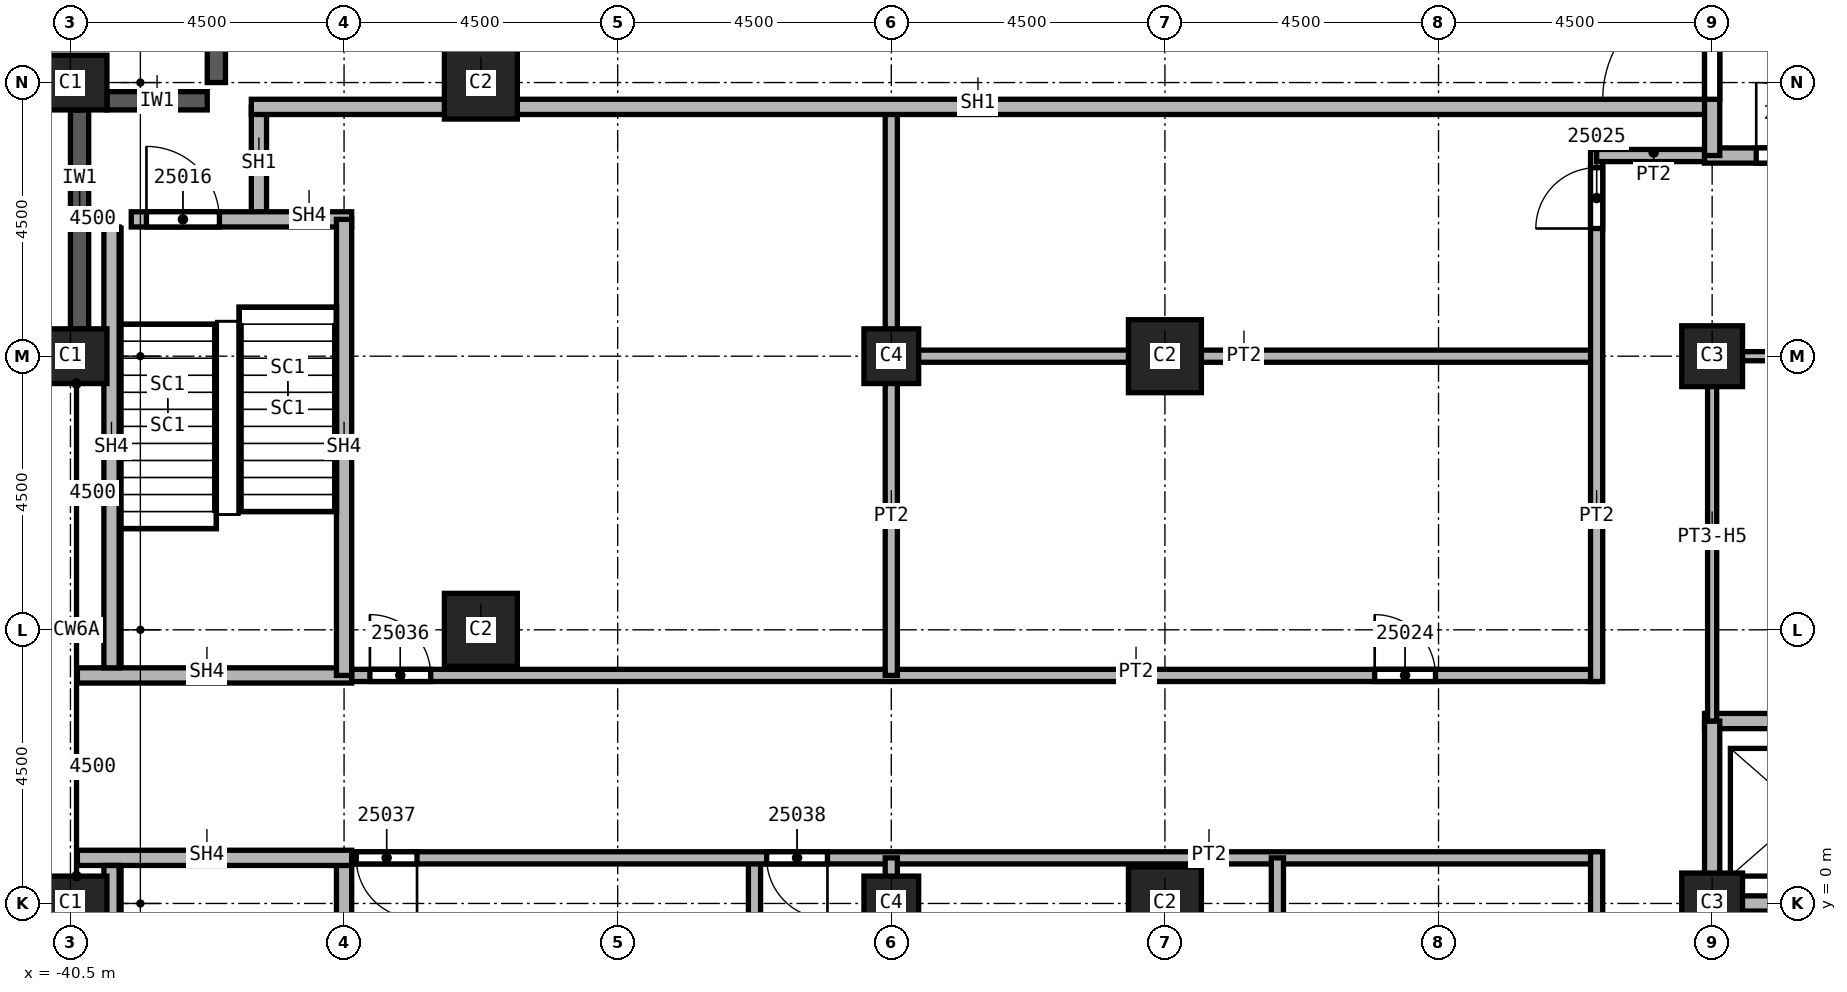
"""IFC4 building model, lengths in metres.
Left out: names, types, materials, properties, quantities, classifications, styles, units other than length and angle.
Written with IfcOpenShell. Run it as: python <this file> out.ifc"""

import sys

from ifc_helpers import new_model, si_unit, direction, frame, frame_2d, origin, origin_2d, place, context, subcontext, project, spatial, rectangle, extrude, element, fill, save


model = new_model("IFC4")
c1 = context("Model", 3, precision=1e-05, world=origin(), true_north=direction((0.0, 1.0)))
c2 = subcontext(c1, "Body", "Model", "MODEL_VIEW")
j1 = project(units=[si_unit("LENGTHUNIT", "METRE"), si_unit("PLANEANGLEUNIT", "RADIAN")], contexts=[c1])
p1 = place(None, origin())
s1 = spatial("IfcSite", under=j1, at=p1, CompositionType="ELEMENT")
p2 = place(p1, origin())
s2 = spatial("IfcBuilding", under=s1, at=p2, CompositionType="ELEMENT")
p3 = place(p2, frame((0.0, 0.0, 60.0)))
s3 = spatial("IfcBuildingStorey", under=s2, at=p3, CompositionType="ELEMENT", Elevation=60.0)
for number, where, z_axis, x_axis in (
    (1, (-40.5, 0.0, 0.0), (0.0, 0.0, 1.0), (0.0, 1.0, 0.0)),
    (2, (-40.5, 9.0, 0.0), (0.0, 0.0, 1.0), (0.0, 1.0, 0.0)),
    (3, (-40.5, 13.5, 0.0), (0.0, 0.0, 1.0), (0.0, 1.0, 0.0)),
):
    element("IfcColumn", number, at=place(p3, frame(where, z_axis=z_axis, x_axis=x_axis)), inside=s3, PredefinedType="COLUMN", context=c2, shape_type="SweptSolid", body=[
        extrude(rectangle(XDim=0.9, YDim=1.2, at=origin_2d()), origin(), (0.0, 0.0, 1.0), 7.7),
    ])
for number, where, z_axis, x_axis in (
    (4, (-33.75, 4.5, 0.0), (0.0, 0.0, 1.0), (1.0, 0.0, 0.0)),
    (5, (-33.75, 13.5, 0.0), (0.0, 0.0, 1.0), (1.0, 0.0, 0.0)),
    (6, (-22.5, 0.0, 0.0), (0.0, 0.0, 1.0), (1.0, 0.0, 0.0)),
    (7, (-22.5, 9.0, 0.0), (0.0, 0.0, 1.0), (1.0, 0.0, 0.0)),
):
    element("IfcColumn", number, at=place(p3, frame(where, z_axis=z_axis, x_axis=x_axis)), inside=s3, PredefinedType="COLUMN", context=c2, shape_type="SweptSolid", body=[
        extrude(rectangle(XDim=1.2, YDim=1.2, at=origin_2d()), origin(), (0.0, 0.0, 1.0), 7.7),
    ])
for number, where, z_axis, x_axis in (
    (8, (-13.5, 0.0, 0.0), (0.0, 0.0, 1.0), (1.0, 0.0, 0.0)),
    (9, (-13.5, 9.0, 0.0), (0.0, 0.0, 1.0), (1.0, 0.0, 0.0)),
):
    element("IfcColumn", number, at=place(p3, frame(where, z_axis=z_axis, x_axis=x_axis)), inside=s3, PredefinedType="COLUMN", context=c2, shape_type="SweptSolid", body=[
        extrude(rectangle(XDim=1.0, YDim=1.0, at=origin_2d()), origin(), (0.0, 0.0, 1.0), 7.7),
    ])
for number, where, z_axis, x_axis in (
    (10, (-27.0, 0.0, 0.0), (0.0, 0.0, 1.0), (1.0, 0.0, 0.0)),
    (11, (-27.0, 9.0, 0.0), (0.0, 0.0, 1.0), (1.0, 0.0, 0.0)),
):
    element("IfcColumn", number, at=place(p3, frame(where, z_axis=z_axis, x_axis=x_axis)), inside=s3, PredefinedType="COLUMN", context=c2, shape_type="SweptSolid", body=[
        extrude(rectangle(XDim=0.9, YDim=0.9, at=origin_2d()), origin(), (0.0, 0.0, 1.0), 7.7),
    ])
p4 = place(p3, frame((-38.1, 15.3, 0.0), z_axis=(0.0, 0.0, 1.0), x_axis=(0.0, -1.0, 0.0)))
e12 = element("IfcWall", 12, at=p4, inside=s3, PredefinedType="SOLIDWALL", context=c2, shape_type="SweptSolid", body=[
    extrude(rectangle(XDim=1.8, YDim=0.3, at=frame_2d((0.9, 0.0))), origin(), (0.0, 0.0, 1.0), 7.1),
])
p5 = place(p3, frame((-39.9, 13.2, 0.0), z_axis=(0.0, 0.0, 1.0), x_axis=(1.0, 0.0, 0.0)))
e13 = element("IfcWall", 13, at=p5, inside=s3, PredefinedType="SOLIDWALL", context=c2, shape_type="SweptSolid", body=[
    extrude(rectangle(XDim=1.65, YDim=0.3, at=frame_2d((0.825, 0.0))), origin(), (0.0, 0.0, 1.0), 7.1),
])
p6 = place(p3, frame((-40.35, 13.05, 0.0), z_axis=(0.0, 0.0, 1.0), x_axis=(0.0, -1.0, 0.0)))
e14 = element("IfcWall", 14, at=p6, inside=s3, PredefinedType="SOLIDWALL", context=c2, shape_type="SweptSolid", body=[
    extrude(rectangle(XDim=3.6, YDim=0.3, at=frame_2d((1.8, 0.0))), origin(), (0.0, 0.0, 1.0), 7.1),
])
p7 = place(p3, frame((-36.125, 3.75, 0.0), z_axis=(0.0, 0.0, 1.0), x_axis=(1.0, 0.0, 0.0)))
e15 = element("IfcWall", 15, at=p7, inside=s3, PredefinedType="PARTITIONING", context=c2, shape_type="SweptSolid", body=[
    extrude(rectangle(XDim=20.725, YDim=0.2, at=frame_2d((10.363, 0.0))), origin(), (0.0, 0.0, 1.0), 7.7),
])
p8 = place(p7, frame((17.075, 0.0, 0.0)))
e16 = element("IfcOpeningElement", 16, at=p8, cuts=e15, PredefinedType="OPENING", context=c2, shape_type="SweptSolid", body=[
    extrude(rectangle(XDim=1.0, YDim=2.1, at=frame_2d((0.5, 1.05))), frame((0.0, 0.1, 0.0), z_axis=(0.0, -1.0, 0.0), x_axis=(1.0, 0.0, 0.0)), (0.0, 0.0, 1.0), 0.2),
])
p9 = place(p7, frame((0.55, 0.0, 0.0)))
e17 = element("IfcOpeningElement", 17, at=p9, cuts=e15, PredefinedType="OPENING", context=c2, shape_type="SweptSolid", body=[
    extrude(rectangle(XDim=1.0, YDim=2.1, at=frame_2d((0.5, 1.05))), frame((0.0, 0.1, 0.0), z_axis=(0.0, -1.0, 0.0), x_axis=(1.0, 0.0, 0.0)), (0.0, 0.0, 1.0), 0.2),
])
p10 = place(p3, frame((-29.25, 0.75, 0.0), z_axis=(0.0, 0.0, 1.0), x_axis=(0.0, -1.0, 0.0)))
e18 = element("IfcWall", 18, at=p10, inside=s3, PredefinedType="PARTITIONING", context=c2, shape_type="SweptSolid", body=[
    extrude(rectangle(XDim=16.65, YDim=0.2, at=frame_2d((8.325, 0.0))), origin(), (0.0, 0.0, 1.0), 7.7),
])
p11 = place(p3, frame((-15.4, 0.75, 0.0), z_axis=(0.0, 0.0, 1.0), x_axis=(-1.0, 0.0, 0.0)))
e19 = element("IfcWall", 19, at=p11, inside=s3, PredefinedType="PARTITIONING", context=c2, shape_type="SweptSolid", body=[
    extrude(rectangle(XDim=20.725, YDim=0.2, at=frame_2d((10.363, 0.0))), origin(), (0.0, 0.0, 1.0), 7.7),
])
p12 = place(p11, frame((19.4, 0.0, 0.0)))
e20 = element("IfcOpeningElement", 20, at=p12, cuts=e19, PredefinedType="OPENING", context=c2, shape_type="SweptSolid", body=[
    extrude(rectangle(XDim=1.0, YDim=2.1, at=frame_2d((0.5, 1.05))), frame((0.0, 0.1, 0.0), z_axis=(0.0, -1.0, 0.0), x_axis=(1.0, 0.0, 0.0)), (0.0, 0.0, 1.0), 0.2),
])
p13 = place(p11, frame((12.65, 0.0, 0.0)))
e21 = element("IfcOpeningElement", 21, at=p13, cuts=e19, PredefinedType="OPENING", context=c2, shape_type="SweptSolid", body=[
    extrude(rectangle(XDim=1.0, YDim=2.1, at=frame_2d((0.5, 1.05))), frame((0.0, 0.1, 0.0), z_axis=(0.0, -1.0, 0.0), x_axis=(1.0, 0.0, 0.0)), (0.0, 0.0, 1.0), 0.2),
])
p14 = place(p3, frame((-27.1, 9.0, 0.0), z_axis=(0.0, 0.0, 1.0), x_axis=(1.0, 0.0, 0.0)))
e22 = element("IfcWall", 22, at=p14, inside=s3, PredefinedType="PARTITIONING", context=c2, shape_type="SweptSolid", body=[
    extrude(rectangle(XDim=11.7, YDim=0.2, at=frame_2d((5.85, 0.0))), origin(), (0.0, 0.0, 1.0), 7.7),
])
p15 = place(p3, frame((-27.0, -15.75, 0.0), z_axis=(0.0, 0.0, 1.0), x_axis=(0.0, 1.0, 0.0)))
e23 = element("IfcWall", 23, at=p15, inside=s3, PredefinedType="PARTITIONING", context=c2, shape_type="SweptSolid", body=[
    extrude(rectangle(XDim=16.5, YDim=0.2, at=frame_2d((8.25, 0.0))), origin(), (0.0, 0.0, 1.0), 7.7),
])
p16 = place(p3, frame((-27.0, 3.75, 0.0), z_axis=(0.0, 0.0, 1.0), x_axis=(0.0, 1.0, 0.0)))
e24 = element("IfcWall", 24, at=p16, inside=s3, PredefinedType="PARTITIONING", context=c2, shape_type="SweptSolid", body=[
    extrude(rectangle(XDim=9.35, YDim=0.2, at=frame_2d((4.675, 0.0))), origin(), (0.0, 0.0, 1.0), 7.7),
])
p17 = place(p3, frame((-20.65, -6.75, 0.0), z_axis=(0.0, 0.0, 1.0), x_axis=(0.0, 1.0, 0.0)))
e25 = element("IfcWall", 25, at=p17, inside=s3, PredefinedType="PARTITIONING", context=c2, shape_type="SweptSolid", body=[
    extrude(rectangle(XDim=7.5, YDim=0.2, at=frame_2d((3.75, 0.0))), origin(), (0.0, 0.0, 1.0), 7.7),
])
p18 = place(p17, frame((1.45, 0.0, 0.0)))
e26 = element("IfcOpeningElement", 26, at=p18, cuts=e25, PredefinedType="OPENING", context=c2, shape_type="SweptSolid", body=[
    extrude(rectangle(XDim=1.0, YDim=2.1, at=frame_2d((0.5, 1.05))), frame((0.0, 0.1, 0.0), z_axis=(0.0, -1.0, 0.0), x_axis=(1.0, 0.0, 0.0)), (0.0, 0.0, 1.0), 0.2),
])
p19 = place(p3, frame((-15.4, -12.3, 0.0), z_axis=(0.0, 0.0, 1.0), x_axis=(0.0, 1.0, 0.0)))
e27 = element("IfcWall", 27, at=p19, inside=s3, PredefinedType="PARTITIONING", context=c2, shape_type="SweptSolid", body=[
    extrude(rectangle(XDim=13.15, YDim=0.2, at=frame_2d((6.575, 0.0))), origin(), (0.0, 0.0, 1.0), 7.7),
])
p20 = place(p19, frame((2.85, 0.0, 0.0)))
e28 = element("IfcOpeningElement", 28, at=p20, cuts=e27, PredefinedType="OPENING", context=c2, shape_type="SweptSolid", body=[
    extrude(rectangle(XDim=1.0, YDim=2.1, at=frame_2d((0.5, 1.05))), frame((0.0, 0.1, 0.0), z_axis=(0.0, -1.0, 0.0), x_axis=(1.0, 0.0, 0.0)), (0.0, 0.0, 1.0), 0.2),
])
p21 = place(p19, frame((7.95, 0.0, 0.0)))
e29 = element("IfcOpeningElement", 29, at=p21, cuts=e27, PredefinedType="OPENING", context=c2, shape_type="SweptSolid", body=[
    extrude(rectangle(XDim=1.0, YDim=2.1, at=frame_2d((0.5, 1.05))), frame((0.0, 0.1, 0.0), z_axis=(0.0, -1.0, 0.0), x_axis=(1.0, 0.0, 0.0)), (0.0, 0.0, 1.0), 0.2),
])
p22 = place(p3, frame((-15.4, 3.65, 0.0), z_axis=(0.0, 0.0, 1.0), x_axis=(0.0, 1.0, 0.0)))
e30 = element("IfcWall", 30, at=p22, inside=s3, PredefinedType="PARTITIONING", context=c2, shape_type="SweptSolid", body=[
    extrude(rectangle(XDim=8.75, YDim=0.2, at=frame_2d((4.375, 0.0))), origin(), (0.0, 0.0, 1.0), 7.7),
])
p23 = place(p22, frame((7.45, 0.0, 0.0)))
e31 = element("IfcOpeningElement", 31, at=p23, cuts=e30, PredefinedType="OPENING", context=c2, shape_type="SweptSolid", body=[
    extrude(rectangle(XDim=1.0, YDim=2.1, at=frame_2d((0.5, 1.05))), frame((0.0, 0.1, 0.0), z_axis=(0.0, -1.0, 0.0), x_axis=(1.0, 0.0, 0.0)), (0.0, 0.0, 1.0), 0.2),
])
p24 = place(p3, frame((-15.4, 12.3, 0.0), z_axis=(0.0, 0.0, 1.0), x_axis=(1.0, 0.0, 0.0)))
e32 = element("IfcWall", 32, at=p24, inside=s3, PredefinedType="PARTITIONING", context=c2, shape_type="SweptSolid", body=[
    extrude(rectangle(XDim=2.025, YDim=0.2, at=frame_2d((1.012, 0.0))), origin(), (0.0, 0.0, 1.0), 7.7),
])
p25 = place(p3, frame((-37.4, 13.1, 0.0), z_axis=(0.0, 0.0, 1.0), x_axis=(0.0, -1.0, 0.0)))
e33 = element("IfcWall", 33, at=p25, inside=s3, PredefinedType="SOLIDWALL", context=c2, shape_type="SweptSolid", body=[
    extrude(rectangle(XDim=1.85, YDim=0.25, at=frame_2d((0.925, 0.0))), origin(), (0.0, 0.0, 1.0), 7.7),
])
p26 = place(p3, frame((-13.5, 13.1, 0.0), z_axis=(0.0, 0.0, 1.0), x_axis=(-1.0, 0.0, 0.0)))
e34 = element("IfcWall", 34, at=p26, inside=s3, PredefinedType="SOLIDWALL", context=c2, shape_type="SweptSolid", body=[
    extrude(rectangle(XDim=24.025, YDim=0.25, at=frame_2d((12.012, 0.0))), origin(), (0.0, 0.0, 1.0), 7.7),
])
p27 = place(p3, frame((-13.625, 0.0, 0.0), z_axis=(0.0, 0.0, 1.0), x_axis=(1.0, 0.0, 0.0)))
e35 = element("IfcWall", 35, at=p27, inside=s3, PredefinedType="SOLIDWALL", context=c2, shape_type="SweptSolid", body=[
    extrude(rectangle(XDim=3.125, YDim=0.25, at=frame_2d((1.562, 0.0))), origin(), (0.0, 0.0, 1.0), 7.7),
])
p28 = place(p3, frame((-13.625, 3.0, 0.0), z_axis=(0.0, 0.0, 1.0), x_axis=(1.0, 0.0, 0.0)))
e36 = element("IfcWall", 36, at=p28, inside=s3, PredefinedType="SOLIDWALL", context=c2, shape_type="SweptSolid", body=[
    extrude(rectangle(XDim=6.125, YDim=0.25, at=frame_2d((3.062, 0.0))), origin(), (0.0, 0.0, 1.0), 7.7),
])
p29 = place(p28, frame((3.25, 0.0, 0.0)))
e37 = element("IfcOpeningElement", 37, at=p29, cuts=e36, PredefinedType="OPENING", context=c2, shape_type="SweptSolid", body=[
    extrude(rectangle(XDim=1.1, YDim=2.1, at=frame_2d((0.55, 1.05))), frame((0.0, 0.125, 0.0), z_axis=(0.0, -1.0, 0.0), x_axis=(1.0, 0.0, 0.0)), (0.0, 0.0, 1.0), 0.25),
])
p30 = place(p3, frame((-13.5, -3.0, 0.0), z_axis=(0.0, 0.0, 1.0), x_axis=(0.0, 1.0, 0.0)))
e38 = element("IfcWall", 38, at=p30, inside=s3, PredefinedType="SOLIDWALL", context=c2, shape_type="SweptSolid", body=[
    extrude(rectangle(XDim=6.0, YDim=0.25, at=frame_2d((3.0, 0.0))), origin(), (0.0, 0.0, 1.0), 6.938),
])
p31 = place(p3, frame((-40.386, 3.75, 0.0), z_axis=(0.0, 0.0, 1.0), x_axis=(1.0, 0.0, 0.0)))
e39 = element("IfcWall", 39, at=p31, inside=s3, PredefinedType="SOLIDWALL", context=c2, shape_type="SweptSolid", body=[
    extrude(rectangle(XDim=4.511, YDim=0.25, at=frame_2d((2.255, 0.0))), origin(), (0.0, 0.0, 1.0), 7.7),
])
p32 = place(p3, frame((-39.5, 11.25, 0.0), z_axis=(0.0, 0.0, 1.0), x_axis=(1.0, 0.0, 0.0)))
e40 = element("IfcWall", 40, at=p32, inside=s3, PredefinedType="SOLIDWALL", context=c2, shape_type="SweptSolid", body=[
    extrude(rectangle(XDim=3.625, YDim=0.25, at=frame_2d((1.812, 0.0))), origin(), (0.0, 0.0, 1.0), 7.7),
])
p33 = place(p32, frame((0.25, 0.0, 0.0)))
e41 = element("IfcOpeningElement", 41, at=p33, cuts=e40, PredefinedType="OPENING", context=c2, shape_type="SweptSolid", body=[
    extrude(rectangle(XDim=1.2, YDim=2.1, at=frame_2d((0.6, 1.05))), frame((0.0, 0.125, 0.0), z_axis=(0.0, -1.0, 0.0), x_axis=(1.0, 0.0, 0.0)), (0.0, 0.0, 1.0), 0.25),
])
for number, where, z_axis, x_axis in (
    (42, (-36.0, 0.75, 0.0), (0.0, 0.0, 1.0), (0.0, -1.0, 0.0)),
    (43, (-36.0, 11.25, 0.0), (0.0, 0.0, 1.0), (0.0, -1.0, 0.0)),
):
    element("IfcWall", number, at=place(p3, frame(where, z_axis=z_axis, x_axis=x_axis)), inside=s3, PredefinedType="SOLIDWALL", context=c2, shape_type="SweptSolid", body=[
        extrude(rectangle(XDim=7.5, YDim=0.25, at=frame_2d((3.75, 0.0))), origin(), (0.0, 0.0, 1.0), 7.7),
    ])
p34 = place(p3, frame((-35.875, 0.75, 0.0), z_axis=(0.0, 0.0, 1.0), x_axis=(-1.0, 0.0, 0.0)))
e44 = element("IfcWall", 44, at=p34, inside=s3, PredefinedType="SOLIDWALL", context=c2, shape_type="SweptSolid", body=[
    extrude(rectangle(XDim=4.511, YDim=0.25, at=frame_2d((2.255, 0.0))), origin(), (0.0, 0.0, 1.0), 7.7),
])
p35 = place(p3, frame((-13.625, 12.3, 0.0), z_axis=(0.0, 0.0, 1.0), x_axis=(1.0, 0.0, 0.0)))
e45 = element("IfcWall", 45, at=p35, inside=s3, PredefinedType="SOLIDWALL", context=c2, shape_type="SweptSolid", body=[
    extrude(rectangle(XDim=9.25, YDim=0.25, at=frame_2d((4.625, 0.0))), origin(), (0.0, 0.0, 1.0), 7.7),
])
p36 = place(p35, frame((0.85, 0.0, 0.0)))
e46 = element("IfcOpeningElement", 46, at=p36, cuts=e45, PredefinedType="OPENING", context=c2, shape_type="SweptSolid", body=[
    extrude(rectangle(XDim=1.2, YDim=2.1, at=frame_2d((0.6, 1.05))), frame((0.0, 0.125, 0.0), z_axis=(0.0, -1.0, 0.0), x_axis=(1.0, 0.0, 0.0)), (0.0, 0.0, 1.0), 0.25),
])
p37 = place(p3, frame((-13.5, 12.3, 0.0), z_axis=(0.0, 0.0, 1.0), x_axis=(0.0, 1.0, 0.0)))
e47 = element("IfcWall", 47, at=p37, inside=s3, PredefinedType="SOLIDWALL", context=c2, shape_type="SweptSolid", body=[
    extrude(rectangle(XDim=4.5, YDim=0.25, at=frame_2d((2.25, 0.0))), origin(), (0.0, 0.0, 1.0), 7.7),
])
p38 = place(p37, frame((0.925, 0.0, 0.0)))
e48 = element("IfcOpeningElement", 48, at=p38, cuts=e47, PredefinedType="OPENING", context=c2, shape_type="SweptSolid", body=[
    extrude(rectangle(XDim=1.8, YDim=2.1, at=frame_2d((0.9, 1.05))), frame((0.0, 0.125, 0.0), z_axis=(0.0, -1.0, 0.0), x_axis=(1.0, 0.0, 0.0)), (0.0, 0.0, 1.0), 0.25),
])
p39 = place(p3, frame((-13.5, 3.0, 0.0), z_axis=(0.0, 0.0, 1.0), x_axis=(0.0, 1.0, 0.0)))
e49 = element("IfcWall", 49, at=p39, inside=s3, PredefinedType="PARTITIONING", context=c2, shape_type="SweptSolid", body=[
    extrude(rectangle(XDim=6.075, YDim=0.15, at=frame_2d((3.038, 0.0))), origin(), (0.0, 0.0, 1.0), 6.938),
])
p40 = place(p3, frame((-13.5, 9.0, 0.0), z_axis=(0.0, 0.0, 1.0), x_axis=(1.0, 0.0, 0.0)))
e50 = element("IfcWall", 50, at=p40, inside=s3, PredefinedType="PARTITIONING", context=c2, shape_type="SweptSolid", body=[
    extrude(rectangle(XDim=3.0, YDim=0.15, at=frame_2d((1.5, 0.0))), origin(), (0.0, 0.0, 1.0), 6.938),
])
for number, where, z_axis, x_axis in (
    (51, (-39.825, 3.875, 0.0), (0.0, 0.0, 1.0), (0.0, 1.0, 0.0)),
    (52, (-39.825, -6.625, 0.0), (0.0, 0.0, 1.0), (0.0, 1.0, 0.0)),
):
    element("IfcWall", number, at=place(p3, frame(where, z_axis=z_axis, x_axis=x_axis)), inside=s3, PredefinedType="SOLIDWALL", context=c2, shape_type="SweptSolid", body=[
        extrude(rectangle(XDim=7.25, YDim=0.25, at=frame_2d((3.625, 0.0))), origin(), (0.0, 0.0, 1.0), 7.7),
    ])
p41 = place(p38, origin())
e53 = element("IfcDoor", 53, at=p41, inside=s3, OperationType="SINGLE_SWING_RIGHT", PredefinedType="DOOR", context=c2, shape_type="SweptSolid", body=[
    extrude(rectangle(XDim=1.8, YDim=2.1, at=frame_2d((0.9, 1.05))), frame((0.0, 0.025, 0.0), z_axis=(0.0, -1.0, 0.0), x_axis=(1.0, 0.0, 0.0)), (0.0, 0.0, 1.0), 0.05),
])
fill(e48, e53)
p42 = place(p36, origin())
e54 = element("IfcDoor", 54, at=p42, inside=s3, OperationType="SINGLE_SWING_LEFT", PredefinedType="DOOR", context=c2, shape_type="SweptSolid", body=[
    extrude(rectangle(XDim=1.2, YDim=2.1, at=frame_2d((0.6, 1.05))), frame((0.0, 0.025, 0.0), z_axis=(0.0, -1.0, 0.0), x_axis=(1.0, 0.0, 0.0)), (0.0, 0.0, 1.0), 0.05),
])
fill(e46, e54)
p43 = place(p33, origin())
e55 = element("IfcDoor", 55, at=p43, inside=s3, OperationType="SINGLE_SWING_LEFT", PredefinedType="DOOR", context=c2, shape_type="SweptSolid", body=[
    extrude(rectangle(XDim=1.2, YDim=2.1, at=frame_2d((0.6, 1.05))), frame((0.0, 0.025, 0.0), z_axis=(0.0, -1.0, 0.0), x_axis=(1.0, 0.0, 0.0)), (0.0, 0.0, 1.0), 0.05),
])
fill(e41, e55)
p44 = place(p8, origin())
e56 = element("IfcDoor", 56, at=p44, inside=s3, OperationType="SINGLE_SWING_LEFT", PredefinedType="DOOR", context=c2, shape_type="SweptSolid", body=[
    extrude(rectangle(XDim=1.0, YDim=2.1, at=frame_2d((0.5, 1.05))), frame((0.0, 0.025, 0.0), z_axis=(0.0, -1.0, 0.0), x_axis=(1.0, 0.0, 0.0)), (0.0, 0.0, 1.0), 0.05),
])
fill(e16, e56)
p45 = place(p23, origin())
e57 = element("IfcDoor", 57, at=p45, inside=s3, OperationType="SINGLE_SWING_RIGHT", PredefinedType="DOOR", context=c2, shape_type="SweptSolid", body=[
    extrude(rectangle(XDim=1.0, YDim=2.1, at=frame_2d((0.5, 1.05))), frame((0.0, 0.025, 0.0), z_axis=(0.0, -1.0, 0.0), x_axis=(1.0, 0.0, 0.0)), (0.0, 0.0, 1.0), 0.05),
])
fill(e31, e57)
p46 = place(p9, origin())
e58 = element("IfcDoor", 58, at=p46, inside=s3, OperationType="SINGLE_SWING_LEFT", PredefinedType="DOOR", context=c2, shape_type="SweptSolid", body=[
    extrude(rectangle(XDim=1.0, YDim=2.1, at=frame_2d((0.5, 1.05))), frame((0.0, 0.025, 0.0), z_axis=(0.0, -1.0, 0.0), x_axis=(1.0, 0.0, 0.0)), (0.0, 0.0, 1.0), 0.05),
])
fill(e17, e58)
p47 = place(p12, origin())
e59 = element("IfcDoor", 59, at=p47, inside=s3, OperationType="SINGLE_SWING_RIGHT", PredefinedType="DOOR", context=c2, shape_type="SweptSolid", body=[
    extrude(rectangle(XDim=1.0, YDim=2.1, at=frame_2d((0.5, 1.05))), frame((0.0, 0.025, 0.0), z_axis=(0.0, -1.0, 0.0), x_axis=(1.0, 0.0, 0.0)), (0.0, 0.0, 1.0), 0.05),
])
fill(e20, e59)
p48 = place(p13, origin())
e60 = element("IfcDoor", 60, at=p48, inside=s3, OperationType="SINGLE_SWING_LEFT", PredefinedType="DOOR", context=c2, shape_type="SweptSolid", body=[
    extrude(rectangle(XDim=1.0, YDim=2.1, at=frame_2d((0.5, 1.05))), frame((0.0, 0.025, 0.0), z_axis=(0.0, -1.0, 0.0), x_axis=(1.0, 0.0, 0.0)), (0.0, 0.0, 1.0), 0.05),
])
fill(e21, e60)
save(model, sys.argv[1])
